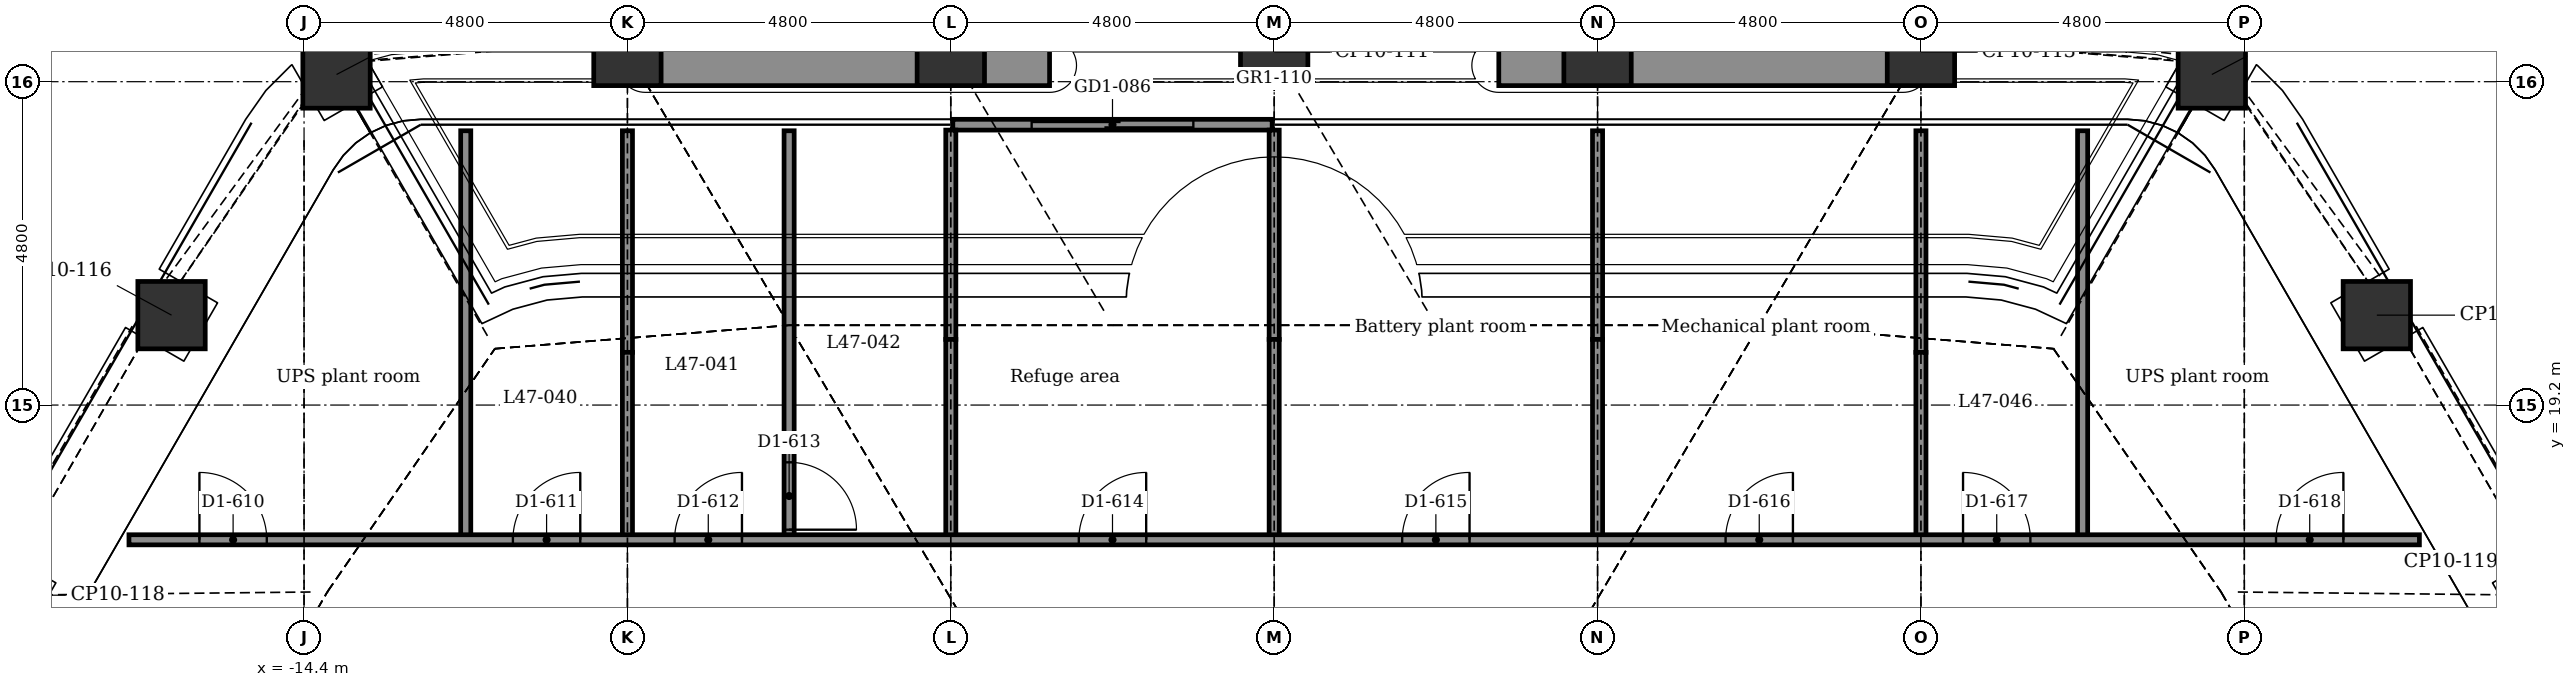
"""IFC4 building model, lengths in metres.
Left out: names, types, materials, properties, quantities, classifications, styles, units other than length and angle.
Written with IfcOpenShell. Run it as: python <this file> out.ifc"""

import sys

from ifc_helpers import new_model, si_unit, direction, frame, frame_2d, origin, origin_2d, place, context, subcontext, project, spatial, rectangle, extrude, element, fill, save


model = new_model("IFC4")
c1 = context("Model", 3, precision=1e-05, world=origin(), true_north=direction((0.0, 1.0)))
c2 = subcontext(c1, "Body", "Model", "MODEL_VIEW")
j1 = project(units=[si_unit("LENGTHUNIT", "METRE"), si_unit("PLANEANGLEUNIT", "RADIAN")], contexts=[c1])
p1 = place(None, origin())
s1 = spatial("IfcSite", under=j1, at=p1, CompositionType="ELEMENT")
p2 = place(p1, origin())
s2 = spatial("IfcBuilding", under=s1, at=p2, CompositionType="ELEMENT")
p3 = place(p2, frame((0.0, 0.0, 216.8)))
s3 = spatial("IfcBuildingStorey", under=s2, at=p3, CompositionType="ELEMENT", Elevation=216.8)
for number, where, z_axis, x_axis in (
    (1, (-13.918, 24.107, -0.3), (0.0, 0.0, 1.0), (0.866, 0.5, 0.0)),
    (2, (-9.6, 24.442, -0.3), (0.0, 0.0, 1.0), (1.0, 0.0, 0.0)),
    (3, (-4.8, 24.442, -0.3), (0.0, 0.0, 1.0), (1.0, 0.0, 0.0)),
    (4, (0.0, 24.442, -0.3), (0.0, 0.0, 1.0), (1.0, 0.0, 0.0)),
    (5, (4.8, 24.442, -0.3), (0.0, 0.0, 1.0), (1.0, 0.0, 0.0)),
    (6, (9.6, 24.442, -0.3), (0.0, 0.0, 1.0), (1.0, 0.0, 0.0)),
    (7, (13.918, 24.107, -0.3), (0.0, 0.0, 1.0), (0.5, 0.866, 0.0)),
    (8, (16.367, 20.535, -0.3), (0.0, 0.0, 1.0), (0.866, 0.5, 0.0)),
    (9, (18.767, 16.378, -0.3), (0.0, 0.0, 1.0), (0.866, 0.5, 0.0)),
    (10, (-18.767, 16.378, -0.3), (0.0, 0.0, 1.0), (0.5, 0.866, 0.0)),
    (11, (-16.367, 20.535, -0.3), (0.0, 0.0, 1.0), (0.5, 0.866, 0.0)),
):
    element("IfcColumn", number, at=place(p3, frame(where, z_axis=z_axis, x_axis=x_axis)), inside=s3, PredefinedType="COLUMN", context=c2, shape_type="SweptSolid", body=[
        extrude(rectangle(XDim=1.0, YDim=1.0, at=origin_2d()), origin(), (0.0, 0.0, 1.0), 6.15),
    ])
p4 = place(p3, frame((-4.77, 23.362, 0.0), z_axis=(0.0, 0.0, 1.0), x_axis=(1.0, 0.0, 0.0)))
e12 = element("IfcWall", 12, at=p4, inside=s3, PredefinedType="PARTITIONING", context=c2, shape_type="SweptSolid", body=[
    extrude(rectangle(XDim=4.74, YDim=0.16, at=frame_2d((2.37, 0.0))), origin(), (0.0, 0.0, 1.0), 5.7),
])
p5 = place(p4, frame((1.17, 0.0, 0.0)))
e13 = element("IfcOpeningElement", 13, at=p5, cuts=e12, PredefinedType="OPENING", context=c2, shape_type="SweptSolid", body=[
    extrude(rectangle(XDim=2.4, YDim=2.4, at=frame_2d((1.2, 1.2))), frame((0.0, 0.09, 0.0), z_axis=(0.0, -1.0, 0.0), x_axis=(1.0, 0.0, 0.0)), (0.0, 0.0, 1.0), 0.18),
])
p6 = place(p3, frame((-8.8, 24.292, 0.0), z_axis=(0.0, 0.0, 1.0), x_axis=(1.0, 0.0, 0.0)))
e14 = element("IfcWall", 14, at=p6, inside=s3, PredefinedType="USERDEFINED", context=c2, shape_type="SweptSolid", body=[
    extrude(rectangle(XDim=3.2, YDim=0.6, at=frame_2d((1.6, 0.0))), origin(), (0.0, 0.0, 1.0), 0.7),
])
for number, where, z_axis, x_axis in (
    (15, (-9.334, 24.241, 6.0), (0.0, 0.0, 1.0), (1.0, 0.0, 0.0)),
    (16, (3.334, 24.241, 6.0), (0.0, 0.0, 1.0), (1.0, 0.0, 0.0)),
):
    element("IfcWall", number, at=place(p3, frame(where, z_axis=z_axis, x_axis=x_axis)), inside=s3, PredefinedType="USERDEFINED", context=c2, shape_type="SweptSolid", body=[
        extrude(rectangle(XDim=6.0, YDim=0.6, at=frame_2d((3.0, 0.0))), origin(), (0.0, 0.0, 1.0), 0.7),
    ])
p7 = place(p3, frame((12.0, 17.2, 0.0), z_axis=(0.0, 0.0, 1.0), x_axis=(0.0, 1.0, 0.0)))
e17 = element("IfcWall", 17, at=p7, inside=s3, PredefinedType="PARTITIONING", context=c2, shape_type="SweptSolid", body=[
    extrude(rectangle(XDim=6.072, YDim=0.15, at=frame_2d((3.036, 0.0))), origin(), (0.0, 0.0, 1.0), 5.7),
])
p8 = place(p3, frame((9.6, 19.982, 0.0), z_axis=(0.0, 0.0, 1.0), x_axis=(0.0, 1.0, 0.0)))
e18 = element("IfcWall", 18, at=p8, inside=s3, PredefinedType="PARTITIONING", context=c2, shape_type="SweptSolid", body=[
    extrude(rectangle(XDim=3.289, YDim=0.15, at=frame_2d((1.645, 0.0))), origin(), (0.0, 0.0, 1.0), 5.7),
])
p9 = place(p3, frame((9.6, 17.2, 0.0), z_axis=(0.0, 0.0, 1.0), x_axis=(0.0, 1.0, 0.0)))
e19 = element("IfcWall", 19, at=p9, inside=s3, PredefinedType="PARTITIONING", context=c2, shape_type="SweptSolid", body=[
    extrude(rectangle(XDim=2.782, YDim=0.15, at=frame_2d((1.391, 0.0))), origin(), (0.0, 0.0, 1.0), 5.393),
])
p10 = place(p3, frame((4.8, 20.175, 0.0), z_axis=(0.0, 0.0, 1.0), x_axis=(0.0, 1.0, 0.0)))
e20 = element("IfcWall", 20, at=p10, inside=s3, PredefinedType="PARTITIONING", context=c2, shape_type="SweptSolid", body=[
    extrude(rectangle(XDim=3.097, YDim=0.15, at=frame_2d((1.548, 0.0))), origin(), (0.0, 0.0, 1.0), 5.7),
])
p11 = place(p3, frame((4.8, 17.2, 0.0), z_axis=(0.0, 0.0, 1.0), x_axis=(0.0, 1.0, 0.0)))
e21 = element("IfcWall", 21, at=p11, inside=s3, PredefinedType="PARTITIONING", context=c2, shape_type="SweptSolid", body=[
    extrude(rectangle(XDim=2.975, YDim=0.15, at=frame_2d((1.487, 0.0))), origin(), (0.0, 0.0, 1.0), 5.54),
])
p12 = place(p3, frame((0.0, 20.175, 0.0), z_axis=(0.0, 0.0, 1.0), x_axis=(0.0, 1.0, 0.0)))
e22 = element("IfcWall", 22, at=p12, inside=s3, PredefinedType="PARTITIONING", context=c2, shape_type="SweptSolid", body=[
    extrude(rectangle(XDim=3.107, YDim=0.15, at=frame_2d((1.553, 0.0))), origin(), (0.0, 0.0, 1.0), 5.7),
])
p13 = place(p3, frame((0.0, 17.2, 0.0), z_axis=(0.0, 0.0, 1.0), x_axis=(0.0, 1.0, 0.0)))
e23 = element("IfcWall", 23, at=p13, inside=s3, PredefinedType="PARTITIONING", context=c2, shape_type="SweptSolid", body=[
    extrude(rectangle(XDim=2.975, YDim=0.15, at=frame_2d((1.487, 0.0))), origin(), (0.0, 0.0, 1.0), 5.317),
])
p14 = place(p3, frame((-4.8, 20.175, 0.0), z_axis=(0.0, 0.0, 1.0), x_axis=(0.0, 1.0, 0.0)))
e24 = element("IfcWall", 24, at=p14, inside=s3, PredefinedType="PARTITIONING", context=c2, shape_type="SweptSolid", body=[
    extrude(rectangle(XDim=3.107, YDim=0.15, at=frame_2d((1.553, 0.0))), origin(), (0.0, 0.0, 1.0), 5.7),
])
p15 = place(p3, frame((-4.8, 17.2, 0.0), z_axis=(0.0, 0.0, 1.0), x_axis=(0.0, 1.0, 0.0)))
e25 = element("IfcWall", 25, at=p15, inside=s3, PredefinedType="PARTITIONING", context=c2, shape_type="SweptSolid", body=[
    extrude(rectangle(XDim=2.975, YDim=0.15, at=frame_2d((1.487, 0.0))), origin(), (0.0, 0.0, 1.0), 5.54),
])
p16 = place(p3, frame((-7.2, 17.2, 0.0), z_axis=(0.0, 0.0, 1.0), x_axis=(0.0, 1.0, 0.0)))
e26 = element("IfcWall", 26, at=p16, inside=s3, PredefinedType="PARTITIONING", context=c2, shape_type="SweptSolid", body=[
    extrude(rectangle(XDim=6.072, YDim=0.15, at=frame_2d((3.036, 0.0))), origin(), (0.0, 0.0, 1.0), 5.7),
])
p17 = place(p16, frame((0.15, 0.0, 0.0)))
e27 = element("IfcOpeningElement", 27, at=p17, cuts=e26, PredefinedType="OPENING", context=c2, shape_type="SweptSolid", body=[
    extrude(rectangle(XDim=1.0, YDim=2.1, at=frame_2d((0.5, 1.05))), frame((0.0, 0.085, 0.0), z_axis=(0.0, -1.0, 0.0), x_axis=(1.0, 0.0, 0.0)), (0.0, 0.0, 1.0), 0.17),
])
p18 = place(p3, frame((-9.6, 19.982, 0.0), z_axis=(0.0, 0.0, 1.0), x_axis=(0.0, 1.0, 0.0)))
e28 = element("IfcWall", 28, at=p18, inside=s3, PredefinedType="PARTITIONING", context=c2, shape_type="SweptSolid", body=[
    extrude(rectangle(XDim=3.289, YDim=0.15, at=frame_2d((1.645, 0.0))), origin(), (0.0, 0.0, 1.0), 5.7),
])
p19 = place(p3, frame((-9.6, 17.2, 0.0), z_axis=(0.0, 0.0, 1.0), x_axis=(0.0, 1.0, 0.0)))
e29 = element("IfcWall", 29, at=p19, inside=s3, PredefinedType="PARTITIONING", context=c2, shape_type="SweptSolid", body=[
    extrude(rectangle(XDim=2.782, YDim=0.15, at=frame_2d((1.391, 0.0))), origin(), (0.0, 0.0, 1.0), 5.393),
])
p20 = place(p3, frame((-12.0, 17.2, 0.0), z_axis=(0.0, 0.0, 1.0), x_axis=(0.0, 1.0, 0.0)))
e30 = element("IfcWall", 30, at=p20, inside=s3, PredefinedType="PARTITIONING", context=c2, shape_type="SweptSolid", body=[
    extrude(rectangle(XDim=6.072, YDim=0.15, at=frame_2d((3.036, 0.0))), origin(), (0.0, 0.0, 1.0), 5.7),
])
p21 = place(p3, frame((-16.999, 17.2, 0.0), z_axis=(0.0, 0.0, 1.0), x_axis=(1.0, 0.0, 0.0)))
e31 = element("IfcWall", 31, at=p21, inside=s3, PredefinedType="PARTITIONING", context=c2, shape_type="SweptSolid", body=[
    extrude(rectangle(XDim=33.998, YDim=0.15, at=frame_2d((16.999, 0.0))), origin(), (0.0, 0.0, 1.0), 5.85),
])
p22 = place(p21, frame((1.046, 0.0, 0.0)))
e32 = element("IfcOpeningElement", 32, at=p22, cuts=e31, PredefinedType="OPENING", context=c2, shape_type="SweptSolid", body=[
    extrude(rectangle(XDim=1.0, YDim=2.1, at=frame_2d((0.5, 1.05))), frame((0.0, 0.085, 0.0), z_axis=(0.0, -1.0, 0.0), x_axis=(1.0, 0.0, 0.0)), (0.0, 0.0, 1.0), 0.17),
])
p23 = place(p21, frame((5.699, 0.0, 0.0)))
e33 = element("IfcOpeningElement", 33, at=p23, cuts=e31, PredefinedType="OPENING", context=c2, shape_type="SweptSolid", body=[
    extrude(rectangle(XDim=1.0, YDim=2.1, at=frame_2d((0.5, 1.05))), frame((0.0, 0.085, 0.0), z_axis=(0.0, -1.0, 0.0), x_axis=(1.0, 0.0, 0.0)), (0.0, 0.0, 1.0), 0.17),
])
p24 = place(p21, frame((8.099, 0.0, 0.0)))
e34 = element("IfcOpeningElement", 34, at=p24, cuts=e31, PredefinedType="OPENING", context=c2, shape_type="SweptSolid", body=[
    extrude(rectangle(XDim=1.0, YDim=2.1, at=frame_2d((0.5, 1.05))), frame((0.0, 0.085, 0.0), z_axis=(0.0, -1.0, 0.0), x_axis=(1.0, 0.0, 0.0)), (0.0, 0.0, 1.0), 0.17),
])
p25 = place(p21, frame((14.099, 0.0, 0.0)))
e35 = element("IfcOpeningElement", 35, at=p25, cuts=e31, PredefinedType="OPENING", context=c2, shape_type="SweptSolid", body=[
    extrude(rectangle(XDim=1.0, YDim=2.1, at=frame_2d((0.5, 1.05))), frame((0.0, 0.085, 0.0), z_axis=(0.0, -1.0, 0.0), x_axis=(1.0, 0.0, 0.0)), (0.0, 0.0, 1.0), 0.17),
])
p26 = place(p21, frame((18.899, 0.0, 0.0)))
e36 = element("IfcOpeningElement", 36, at=p26, cuts=e31, PredefinedType="OPENING", context=c2, shape_type="SweptSolid", body=[
    extrude(rectangle(XDim=1.0, YDim=2.1, at=frame_2d((0.5, 1.05))), frame((0.0, 0.085, 0.0), z_axis=(0.0, -1.0, 0.0), x_axis=(1.0, 0.0, 0.0)), (0.0, 0.0, 1.0), 0.17),
])
p27 = place(p21, frame((23.699, 0.0, 0.0)))
e37 = element("IfcOpeningElement", 37, at=p27, cuts=e31, PredefinedType="OPENING", context=c2, shape_type="SweptSolid", body=[
    extrude(rectangle(XDim=1.0, YDim=2.1, at=frame_2d((0.5, 1.05))), frame((0.0, 0.085, 0.0), z_axis=(0.0, -1.0, 0.0), x_axis=(1.0, 0.0, 0.0)), (0.0, 0.0, 1.0), 0.17),
])
p28 = place(p21, frame((27.224, 0.0, 0.0)))
e38 = element("IfcOpeningElement", 38, at=p28, cuts=e31, PredefinedType="OPENING", context=c2, shape_type="SweptSolid", body=[
    extrude(rectangle(XDim=1.0, YDim=2.1, at=frame_2d((0.5, 1.05))), frame((0.0, 0.085, 0.0), z_axis=(0.0, -1.0, 0.0), x_axis=(1.0, 0.0, 0.0)), (0.0, 0.0, 1.0), 0.17),
])
p29 = place(p21, frame((31.87, 0.0, 0.0)))
e39 = element("IfcOpeningElement", 39, at=p29, cuts=e31, PredefinedType="OPENING", context=c2, shape_type="SweptSolid", body=[
    extrude(rectangle(XDim=1.0, YDim=2.1, at=frame_2d((0.5, 1.05))), frame((0.0, 0.085, 0.0), z_axis=(0.0, -1.0, 0.0), x_axis=(1.0, 0.0, 0.0)), (0.0, 0.0, 1.0), 0.17),
])
p30 = place(p5, origin())
e40 = element("IfcDoor", 40, at=p30, inside=s3, OperationType="DOUBLE_DOOR_SLIDING", PredefinedType="DOOR", context=c2, shape_type="SweptSolid", body=[
    extrude(rectangle(XDim=2.4, YDim=2.4, at=frame_2d((1.2, 1.2))), frame((0.0, 0.025, 0.0), z_axis=(0.0, -1.0, 0.0), x_axis=(1.0, 0.0, 0.0)), (0.0, 0.0, 1.0), 0.05),
])
fill(e13, e40)
p31 = place(p22, origin())
e41 = element("IfcDoor", 41, at=p31, inside=s3, OperationType="SINGLE_SWING_LEFT", PredefinedType="DOOR", context=c2, shape_type="SweptSolid", body=[
    extrude(rectangle(XDim=1.0, YDim=2.1, at=frame_2d((0.5, 1.05))), frame((0.0, 0.025, 0.0), z_axis=(0.0, -1.0, 0.0), x_axis=(1.0, 0.0, 0.0)), (0.0, 0.0, 1.0), 0.05),
])
fill(e32, e41)
p32 = place(p23, origin())
e42 = element("IfcDoor", 42, at=p32, inside=s3, OperationType="SINGLE_SWING_RIGHT", PredefinedType="DOOR", context=c2, shape_type="SweptSolid", body=[
    extrude(rectangle(XDim=1.0, YDim=2.1, at=frame_2d((0.5, 1.05))), frame((0.0, 0.025, 0.0), z_axis=(0.0, -1.0, 0.0), x_axis=(1.0, 0.0, 0.0)), (0.0, 0.0, 1.0), 0.05),
])
fill(e33, e42)
p33 = place(p24, origin())
e43 = element("IfcDoor", 43, at=p33, inside=s3, OperationType="SINGLE_SWING_RIGHT", PredefinedType="DOOR", context=c2, shape_type="SweptSolid", body=[
    extrude(rectangle(XDim=1.0, YDim=2.1, at=frame_2d((0.5, 1.05))), frame((0.0, 0.025, 0.0), z_axis=(0.0, -1.0, 0.0), x_axis=(1.0, 0.0, 0.0)), (0.0, 0.0, 1.0), 0.05),
])
fill(e34, e43)
p34 = place(p17, frame((1.0, 0.0, 0.0), z_axis=(0.0, 0.0, 1.0), x_axis=(-1.0, 0.0, 0.0)))
e44 = element("IfcDoor", 44, at=p34, inside=s3, OperationType="SINGLE_SWING_LEFT", PredefinedType="DOOR", context=c2, shape_type="SweptSolid", body=[
    extrude(rectangle(XDim=1.0, YDim=2.1, at=frame_2d((0.5, 1.05))), frame((0.0, 0.025, 0.0), z_axis=(0.0, -1.0, 0.0), x_axis=(1.0, 0.0, 0.0)), (0.0, 0.0, 1.0), 0.05),
])
fill(e27, e44)
p35 = place(p25, origin())
e45 = element("IfcDoor", 45, at=p35, inside=s3, OperationType="SINGLE_SWING_RIGHT", PredefinedType="DOOR", context=c2, shape_type="SweptSolid", body=[
    extrude(rectangle(XDim=1.0, YDim=2.1, at=frame_2d((0.5, 1.05))), frame((0.0, 0.025, 0.0), z_axis=(0.0, -1.0, 0.0), x_axis=(1.0, 0.0, 0.0)), (0.0, 0.0, 1.0), 0.05),
])
fill(e35, e45)
p36 = place(p26, origin())
e46 = element("IfcDoor", 46, at=p36, inside=s3, OperationType="SINGLE_SWING_RIGHT", PredefinedType="DOOR", context=c2, shape_type="SweptSolid", body=[
    extrude(rectangle(XDim=1.0, YDim=2.1, at=frame_2d((0.5, 1.05))), frame((0.0, 0.025, 0.0), z_axis=(0.0, -1.0, 0.0), x_axis=(1.0, 0.0, 0.0)), (0.0, 0.0, 1.0), 0.05),
])
fill(e36, e46)
p37 = place(p27, origin())
e47 = element("IfcDoor", 47, at=p37, inside=s3, OperationType="SINGLE_SWING_RIGHT", PredefinedType="DOOR", context=c2, shape_type="SweptSolid", body=[
    extrude(rectangle(XDim=1.0, YDim=2.1, at=frame_2d((0.5, 1.05))), frame((0.0, 0.025, 0.0), z_axis=(0.0, -1.0, 0.0), x_axis=(1.0, 0.0, 0.0)), (0.0, 0.0, 1.0), 0.05),
])
fill(e37, e47)
p38 = place(p28, origin())
e48 = element("IfcDoor", 48, at=p38, inside=s3, OperationType="SINGLE_SWING_LEFT", PredefinedType="DOOR", context=c2, shape_type="SweptSolid", body=[
    extrude(rectangle(XDim=1.0, YDim=2.1, at=frame_2d((0.5, 1.05))), frame((0.0, 0.025, 0.0), z_axis=(0.0, -1.0, 0.0), x_axis=(1.0, 0.0, 0.0)), (0.0, 0.0, 1.0), 0.05),
])
fill(e38, e48)
p39 = place(p29, origin())
e49 = element("IfcDoor", 49, at=p39, inside=s3, OperationType="SINGLE_SWING_RIGHT", PredefinedType="DOOR", context=c2, shape_type="SweptSolid", body=[
    extrude(rectangle(XDim=1.0, YDim=2.1, at=frame_2d((0.5, 1.05))), frame((0.0, 0.025, 0.0), z_axis=(0.0, -1.0, 0.0), x_axis=(1.0, 0.0, 0.0)), (0.0, 0.0, 1.0), 0.05),
])
fill(e39, e49)
save(model, sys.argv[1])
